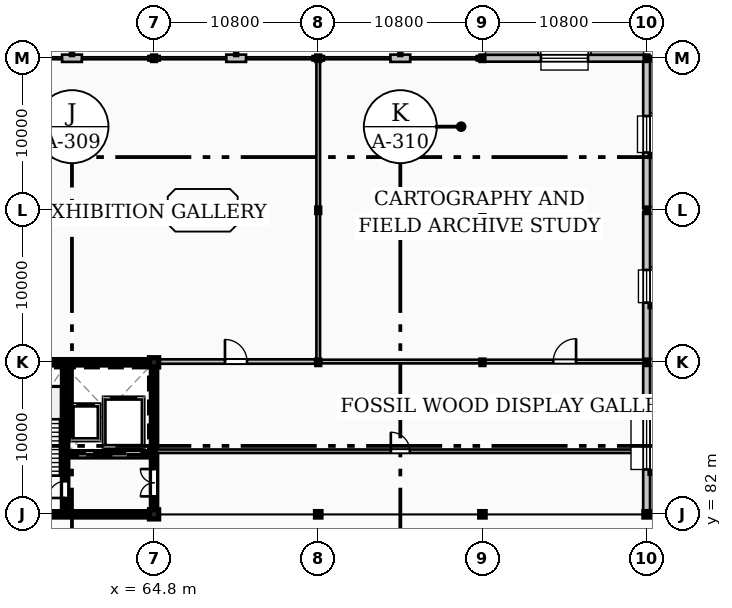
"""IFC4 building model, lengths in metres.
Left out: names, types, materials, properties, quantities, classifications, styles, units other than length and angle.
Written with IfcOpenShell. Run it as: python <this file> out.ifc"""

import sys

from ifc_helpers import new_model, si_unit, direction, frame, frame_2d, origin, origin_2d, place, context, subcontext, project, spatial, polyline, rectangle, hollow_rectangle, hollow_circle, outline, extrude, element, fill, save


model = new_model("IFC4")
c1 = context("Model", 3, precision=1e-05, world=origin(), true_north=direction((0.0, 1.0)))
c2 = subcontext(c1, "Body", "Model", "MODEL_VIEW")
j1 = project(units=[si_unit("LENGTHUNIT", "METRE"), si_unit("PLANEANGLEUNIT", "RADIAN")], contexts=[c1])
p1 = place(None, origin())
s1 = spatial("IfcSite", under=j1, at=p1, CompositionType="ELEMENT")
p2 = place(p1, origin())
s2 = spatial("IfcBuilding", under=s1, at=p2, CompositionType="ELEMENT")
p3 = place(p2, frame((0.0, 0.0, 9.6)))
s3 = spatial("IfcBuildingStorey", under=s2, at=p3, CompositionType="ELEMENT", Elevation=9.6)
for number, where, z_axis, x_axis in (
    (1, (64.8, 82.0, 0.0), (0.0, 0.0, 1.0), (1.0, 0.0, 0.0)),
    (2, (64.8, 92.0, 0.0), (0.0, 0.0, 1.0), (1.0, 0.0, 0.0)),
):
    element("IfcColumn", number, at=place(p3, frame(where, z_axis=z_axis, x_axis=x_axis)), inside=s3, PredefinedType="COLUMN", context=c2, shape_type="SweptSolid", body=[
        extrude(rectangle(XDim=0.6, YDim=0.6, at=origin_2d()), origin(), (0.0, 0.0, 1.0), 4.8),
    ])
for number, where, z_axis, x_axis in (
    (3, (64.8, 102.0, 0.0), (0.0, 0.0, 1.0), (1.0, 0.0, 0.0)),
    (4, (64.8, 112.0, 0.0), (0.0, 0.0, 1.0), (1.0, 0.0, 0.0)),
):
    element("IfcColumn", number, at=place(p3, frame(where, z_axis=z_axis, x_axis=x_axis)), inside=s3, PredefinedType="COLUMN", context=c2, shape_type="SweptSolid", body=[
        extrude(hollow_rectangle(XDim=0.2, YDim=0.3, WallThickness=0.012, InnerFilletRadius=0.012, OuterFilletRadius=0.025, at=origin_2d()), origin(), (0.0, 0.0, 1.0), 4.8),
    ])
p4 = place(p3, frame((75.6, 82.0, 0.0), z_axis=(0.0, 0.0, 1.0), x_axis=(1.0, 0.0, 0.0)))
e5 = element("IfcColumn", 5, at=p4, inside=s3, PredefinedType="COLUMN", context=c2, shape_type="SweptSolid", body=[
    extrude(hollow_circle(Radius=0.178, WallThickness=0.016, at=origin_2d()), origin(), (0.0, 0.0, 1.0), 4.8),
])
for number, where, z_axis, x_axis in (
    (6, (75.6, 92.0, 0.0), (0.0, 0.0, 1.0), (1.0, 0.0, 0.0)),
    (7, (75.6, 102.0, 0.0), (0.0, 0.0, 1.0), (1.0, 0.0, 0.0)),
    (8, (75.6, 112.0, 0.0), (0.0, 0.0, 1.0), (1.0, 0.0, 0.0)),
):
    element("IfcColumn", number, at=place(p3, frame(where, z_axis=z_axis, x_axis=x_axis)), inside=s3, PredefinedType="COLUMN", context=c2, shape_type="SweptSolid", body=[
        extrude(hollow_rectangle(XDim=0.2, YDim=0.3, WallThickness=0.012, InnerFilletRadius=0.012, OuterFilletRadius=0.025, at=origin_2d()), origin(), (0.0, 0.0, 1.0), 4.8),
    ])
p5 = place(p3, frame((86.4, 82.0, 0.0), z_axis=(0.0, 0.0, 1.0), x_axis=(1.0, 0.0, 0.0)))
e9 = element("IfcColumn", 9, at=p5, inside=s3, PredefinedType="COLUMN", context=c2, shape_type="SweptSolid", body=[
    extrude(hollow_circle(Radius=0.178, WallThickness=0.016, at=origin_2d()), origin(), (0.0, 0.0, 1.0), 4.8),
])
for number, where, z_axis, x_axis in (
    (10, (86.4, 92.0, 0.0), (0.0, 0.0, 1.0), (1.0, 0.0, 0.0)),
    (11, (86.4, 102.0, 0.0), (0.0, 0.0, 1.0), (1.0, 0.0, 0.0)),
    (12, (86.4, 112.0, 0.0), (0.0, 0.0, 1.0), (1.0, 0.0, 0.0)),
):
    element("IfcColumn", number, at=place(p3, frame(where, z_axis=z_axis, x_axis=x_axis)), inside=s3, PredefinedType="COLUMN", context=c2, shape_type="SweptSolid", body=[
        extrude(hollow_rectangle(XDim=0.2, YDim=0.3, WallThickness=0.012, InnerFilletRadius=0.012, OuterFilletRadius=0.025, at=origin_2d()), origin(), (0.0, 0.0, 1.0), 4.8),
    ])
p6 = place(p3, frame((97.2, 82.0, 0.0), z_axis=(0.0, 0.0, 1.0), x_axis=(1.0, 0.0, 0.0)))
e13 = element("IfcColumn", 13, at=p6, inside=s3, PredefinedType="COLUMN", context=c2, shape_type="SweptSolid", body=[
    extrude(hollow_circle(Radius=0.178, WallThickness=0.016, at=origin_2d()), origin(), (0.0, 0.0, 1.0), 4.8),
])
for number, where, z_axis, x_axis in (
    (14, (97.2, 92.0, 0.0), (0.0, 0.0, 1.0), (1.0, 0.0, 0.0)),
    (15, (97.2, 102.0, 0.0), (0.0, 0.0, 1.0), (1.0, 0.0, 0.0)),
    (16, (97.2, 112.0, 0.0), (0.0, 0.0, 1.0), (1.0, 0.0, 0.0)),
):
    element("IfcColumn", number, at=place(p3, frame(where, z_axis=z_axis, x_axis=x_axis)), inside=s3, PredefinedType="COLUMN", context=c2, shape_type="SweptSolid", body=[
        extrude(hollow_rectangle(XDim=0.2, YDim=0.3, WallThickness=0.012, InnerFilletRadius=0.012, OuterFilletRadius=0.025, at=origin_2d()), origin(), (0.0, 0.0, 1.0), 4.8),
    ])
p7 = place(p3, frame((97.57, 82.0, 0.0), z_axis=(0.0, 0.0, 1.0), x_axis=(-1.0, 0.0, 0.0)))
e17 = element("IfcWall", 17, at=p7, inside=s3, PredefinedType="STANDARD", context=c2, shape_type="SweptSolid", body=[
    extrude(rectangle(XDim=0.225, YDim=0.3, at=frame_2d((0.113, 0.0))), origin(), (0.0, 0.0, 1.0), 4.56),
])
p8 = place(p3, frame((97.2, 82.145, 0.0), z_axis=(0.0, 0.0, 1.0), x_axis=(0.0, 1.0, 0.0)))
e18 = element("IfcWall", 18, at=p8, inside=s3, PredefinedType="STANDARD", context=c2, shape_type="SweptSolid", body=[
    extrude(rectangle(XDim=9.71, YDim=0.45, at=frame_2d((4.855, 0.0))), origin(), (0.0, 0.0, 1.0), 4.56),
])
p9 = place(p8, frame((2.805, 0.0, 1.0)))
e19 = element("IfcOpeningElement", 19, at=p9, cuts=e18, PredefinedType="OPENING", context=c2, shape_type="SweptSolid", body=[
    extrude(rectangle(XDim=4.1, YDim=1.9, at=frame_2d((2.05, 0.95))), frame((0.0, 0.235, 0.0), z_axis=(0.0, -1.0, 0.0), x_axis=(1.0, 0.0, 0.0)), (0.0, 0.0, 1.0), 0.47),
])
p10 = place(p3, frame((97.2, 92.145, 0.0), z_axis=(0.0, 0.0, 1.0), x_axis=(0.0, 1.0, 0.0)))
e20 = element("IfcWall", 20, at=p10, inside=s3, PredefinedType="STANDARD", context=c2, shape_type="SweptSolid", body=[
    extrude(rectangle(XDim=9.71, YDim=0.45, at=frame_2d((4.855, 0.0))), origin(), (0.0, 0.0, 1.0), 4.56),
])
p11 = place(p10, frame((3.78, 0.0, 1.0)))
e21 = element("IfcOpeningElement", 21, at=p11, cuts=e20, PredefinedType="OPENING", context=c2, shape_type="SweptSolid", body=[
    extrude(rectangle(XDim=2.15, YDim=2.65, at=frame_2d((1.075, 1.325))), frame((0.0, 0.235, 0.0), z_axis=(0.0, -1.0, 0.0), x_axis=(1.0, 0.0, 0.0)), (0.0, 0.0, 1.0), 0.47),
])
p12 = place(p3, frame((97.2, 102.145, 0.0), z_axis=(0.0, 0.0, 1.0), x_axis=(0.0, 1.0, 0.0)))
e22 = element("IfcWall", 22, at=p12, inside=s3, PredefinedType="STANDARD", context=c2, shape_type="SweptSolid", body=[
    extrude(rectangle(XDim=9.71, YDim=0.45, at=frame_2d((4.855, 0.0))), origin(), (0.0, 0.0, 1.0), 4.56),
])
p13 = place(p12, frame((3.655, 0.0, 1.0)))
e23 = element("IfcOpeningElement", 23, at=p13, cuts=e22, PredefinedType="OPENING", context=c2, shape_type="SweptSolid", body=[
    extrude(rectangle(XDim=2.4, YDim=2.4, at=frame_2d((1.2, 1.2))), frame((0.0, 0.235, 0.0), z_axis=(0.0, -1.0, 0.0), x_axis=(1.0, 0.0, 0.0)), (0.0, 0.0, 1.0), 0.47),
])
p14 = place(p3, frame((97.104, 112.0, 0.0), z_axis=(0.0, 0.0, 1.0), x_axis=(-1.0, 0.0, 0.0)))
e24 = element("IfcWall", 24, at=p14, inside=s3, PredefinedType="STANDARD", context=c2, shape_type="SweptSolid", body=[
    extrude(rectangle(XDim=10.608, YDim=0.45, at=frame_2d((5.304, 0.0))), origin(), (0.0, 0.0, 1.0), 4.119),
])
p15 = place(p14, frame((3.754, 0.0, 1.0)))
e25 = element("IfcOpeningElement", 25, at=p15, cuts=e24, PredefinedType="OPENING", context=c2, shape_type="SweptSolid", body=[
    extrude(rectangle(XDim=3.1, YDim=2.75, at=frame_2d((1.55, 1.375))), frame((0.0, 0.235, 0.0), z_axis=(0.0, -1.0, 0.0), x_axis=(1.0, 0.0, 0.0)), (0.0, 0.0, 1.0), 0.47),
])
p16 = place(p3, frame((81.65, 112.0, 0.0), z_axis=(0.0, 0.0, 1.0), x_axis=(-1.0, 0.0, 0.0)))
e26 = element("IfcWall", 26, at=p16, inside=s3, PredefinedType="STANDARD", context=c2, shape_type="SweptSolid", body=[
    extrude(rectangle(XDim=1.3, YDim=0.48, at=frame_2d((0.65, 0.0))), origin(), (0.0, 0.0, 1.0), 4.119),
])
for number, where, z_axis, x_axis in (
    (27, (86.304, 112.0, 0.0), (0.0, 0.0, 1.0), (-1.0, 0.0, 0.0)),
    (28, (75.97, 112.0, 0.0), (0.0, 0.0, 1.0), (-1.0, 0.0, 0.0)),
):
    element("IfcWall", number, at=place(p3, frame(where, z_axis=z_axis, x_axis=x_axis)), inside=s3, PredefinedType="STANDARD", context=c2, shape_type="SweptSolid", body=[
        extrude(rectangle(XDim=0.274, YDim=0.3, at=frame_2d((0.137, 0.0))), origin(), (0.0, 0.0, 1.0), 4.56),
    ])
p17 = place(p3, frame((70.85, 112.0, 0.0), z_axis=(0.0, 0.0, 1.0), x_axis=(-1.0, 0.0, 0.0)))
e29 = element("IfcWall", 29, at=p17, inside=s3, PredefinedType="STANDARD", context=c2, shape_type="SweptSolid", body=[
    extrude(rectangle(XDim=1.3, YDim=0.48, at=frame_2d((0.65, 0.0))), origin(), (0.0, 0.0, 1.0), 4.119),
])
for number, where, z_axis, x_axis in (
    (30, (75.504, 112.0, 0.0), (0.0, 0.0, 1.0), (-1.0, 0.0, 0.0)),
    (31, (65.17, 112.0, 0.0), (0.0, 0.0, 1.0), (-1.0, 0.0, 0.0)),
):
    element("IfcWall", number, at=place(p3, frame(where, z_axis=z_axis, x_axis=x_axis)), inside=s3, PredefinedType="STANDARD", context=c2, shape_type="SweptSolid", body=[
        extrude(rectangle(XDim=0.274, YDim=0.3, at=frame_2d((0.137, 0.0))), origin(), (0.0, 0.0, 1.0), 4.56),
    ])
p18 = place(p3, frame((60.05, 112.0, 0.0), z_axis=(0.0, 0.0, 1.0), x_axis=(-1.0, 0.0, 0.0)))
e32 = element("IfcWall", 32, at=p18, inside=s3, PredefinedType="STANDARD", context=c2, shape_type="SweptSolid", body=[
    extrude(rectangle(XDim=1.3, YDim=0.48, at=frame_2d((0.65, 0.0))), origin(), (0.0, 0.0, 1.0), 4.119),
])
p19 = place(p3, frame((64.704, 112.0, 0.0), z_axis=(0.0, 0.0, 1.0), x_axis=(-1.0, 0.0, 0.0)))
e33 = element("IfcWall", 33, at=p19, inside=s3, PredefinedType="STANDARD", context=c2, shape_type="SweptSolid", body=[
    extrude(rectangle(XDim=0.274, YDim=0.3, at=frame_2d((0.137, 0.0))), origin(), (0.0, 0.0, 1.0), 4.56),
])
p20 = place(p3, frame((97.55, 112.0, -0.02), z_axis=(0.0, 0.0, 1.0), x_axis=(1.0, 0.0, 0.0)))
e34 = element("IfcWall", 34, at=p20, inside=s3, PredefinedType="STANDARD", context=c2, shape_type="SweptSolid", body=[
    extrude(outline(polyline([(0.0, 0.0), (10.25, 0.0), (10.25, 0.04), (0.0, 1.17), (0.0, 0.0)])), frame((0.0, 0.14, 0.0), z_axis=(0.0, -1.0, 0.0), x_axis=(1.0, 0.0, 0.0)), (0.0, 0.0, 1.0), 0.28),
])
for number, where, z_axis, x_axis in (
    (35, (54.3, 82.0, 0.0), (0.0, 0.0, 1.0), (1.0, 0.0, 0.0)),
    (36, (54.3, 92.0, 0.0), (0.0, 0.0, 1.0), (1.0, 0.0, 0.0)),
):
    element("IfcWall", number, at=place(p3, frame(where, z_axis=z_axis, x_axis=x_axis)), inside=s3, PredefinedType="SHEAR", context=c2, shape_type="SweptSolid", body=[
        extrude(rectangle(XDim=10.2, YDim=0.35, at=frame_2d((5.1, 0.0))), origin(), (0.0, 0.0, 1.0), 4.56),
    ])
p21 = place(p3, frame((64.8, 82.3, 0.0), z_axis=(0.0, 0.0, 1.0), x_axis=(0.0, 1.0, 0.0)))
e37 = element("IfcWall", 37, at=p21, inside=s3, PredefinedType="SHEAR", context=c2, shape_type="SweptSolid", body=[
    extrude(rectangle(XDim=9.4, YDim=0.35, at=frame_2d((4.7, 0.0))), origin(), (0.0, 0.0, 1.0), 4.56),
])
p22 = place(p21, frame((0.88, 0.0, 0.0)))
e38 = element("IfcOpeningElement", 38, at=p22, cuts=e37, PredefinedType="OPENING", context=c2, shape_type="SweptSolid", body=[
    extrude(rectangle(XDim=1.8, YDim=2.25, at=frame_2d((0.9, 1.125))), frame((0.0, 0.185, 0.0), z_axis=(0.0, -1.0, 0.0), x_axis=(1.0, 0.0, 0.0)), (0.0, 0.0, 1.0), 0.37),
])
p23 = place(p3, frame((58.95, 82.175, 0.0), z_axis=(0.0, 0.0, 1.0), x_axis=(0.0, 1.0, 0.0)))
e39 = element("IfcWall", 39, at=p23, inside=s3, PredefinedType="SHEAR", context=c2, shape_type="SweptSolid", body=[
    extrude(rectangle(XDim=9.65, YDim=0.35, at=frame_2d((4.825, 0.0))), origin(), (0.0, 0.0, 1.0), 4.56),
])
p24 = place(p23, frame((0.9, 0.0, 0.0)))
e40 = element("IfcOpeningElement", 40, at=p24, cuts=e39, PredefinedType="OPENING", context=c2, shape_type="SweptSolid", body=[
    extrude(rectangle(XDim=1.1, YDim=2.2, at=frame_2d((0.55, 1.1))), frame((0.0, 0.185, 0.0), z_axis=(0.0, -1.0, 0.0), x_axis=(1.0, 0.0, 0.0)), (0.0, 0.0, 1.0), 0.37),
])
p25 = place(p3, frame((59.13, 85.95, 0.0), z_axis=(0.0, 0.0, 1.0), x_axis=(1.0, 0.0, 0.0)))
e41 = element("IfcWall", 41, at=p25, inside=s3, PredefinedType="SHEAR", context=c2, shape_type="SweptSolid", body=[
    extrude(rectangle(XDim=5.49, YDim=0.35, at=frame_2d((2.745, 0.0))), origin(), (0.0, 0.0, 1.0), 4.56),
])
p26 = place(p25, frame((0.65, 0.0, 0.0)))
e42 = element("IfcOpeningElement", 42, at=p26, cuts=e41, PredefinedType="OPENING", context=c2, shape_type="SweptSolid", body=[
    extrude(rectangle(XDim=1.1, YDim=2.2, at=frame_2d((0.55, 1.1))), frame((0.0, 0.185, 0.0), z_axis=(0.0, -1.0, 0.0), x_axis=(1.0, 0.0, 0.0)), (0.0, 0.0, 1.0), 0.37),
])
p27 = place(p25, frame((2.85, 0.0, 0.0)))
e43 = element("IfcOpeningElement", 43, at=p27, cuts=e41, PredefinedType="OPENING", context=c2, shape_type="SweptSolid", body=[
    extrude(rectangle(XDim=2.0, YDim=2.5, at=frame_2d((1.0, 1.25))), frame((0.0, 0.185, 0.0), z_axis=(0.0, -1.0, 0.0), x_axis=(1.0, 0.0, 0.0)), (0.0, 0.0, 1.0), 0.37),
])
p28 = place(p3, frame((64.98, 86.15, 0.0), z_axis=(0.0, 0.0, 1.0), x_axis=(1.0, 0.0, 0.0)))
e44 = element("IfcWall", 44, at=p28, inside=s3, PredefinedType="PARTITIONING", context=c2, shape_type="SweptSolid", body=[
    extrude(rectangle(XDim=32.04, YDim=0.23, at=frame_2d((16.02, 0.0))), origin(), (0.0, 0.0, 1.0), 4.52),
])
p29 = place(p28, frame((15.395, 0.0, 0.0)))
e45 = element("IfcOpeningElement", 45, at=p29, cuts=e44, PredefinedType="OPENING", context=c2, shape_type="SweptSolid", body=[
    extrude(rectangle(XDim=1.25, YDim=2.3, at=frame_2d((0.625, 1.15))), frame((0.0, 0.125, 0.0), z_axis=(0.0, -1.0, 0.0), x_axis=(1.0, 0.0, 0.0)), (0.0, 0.0, 1.0), 0.25),
])
p30 = place(p3, frame((64.98, 92.05, 0.0), z_axis=(0.0, 0.0, 1.0), x_axis=(1.0, 0.0, 0.0)))
e46 = element("IfcWall", 46, at=p30, inside=s3, PredefinedType="PARTITIONING", context=c2, shape_type="SweptSolid", body=[
    extrude(rectangle(XDim=10.42, YDim=0.29, at=frame_2d((5.21, 0.0))), origin(), (0.0, 0.0, 1.0), 4.119),
])
p31 = place(p30, frame((4.485, 0.0, 0.0)))
e47 = element("IfcOpeningElement", 47, at=p31, cuts=e46, PredefinedType="OPENING", context=c2, shape_type="SweptSolid", body=[
    extrude(rectangle(XDim=1.45, YDim=2.35, at=frame_2d((0.725, 1.175))), frame((0.0, 0.155, 0.0), z_axis=(0.0, -1.0, 0.0), x_axis=(1.0, 0.0, 0.0)), (0.0, 0.0, 1.0), 0.31),
])
p32 = place(p3, frame((75.8, 92.05, 0.0), z_axis=(0.0, 0.0, 1.0), x_axis=(1.0, 0.0, 0.0)))
e48 = element("IfcWall", 48, at=p32, inside=s3, PredefinedType="SOLIDWALL", context=c2, shape_type="SweptSolid", body=[
    extrude(rectangle(XDim=10.4, YDim=0.24, at=frame_2d((5.2, 0.0))), origin(), (0.0, 0.0, 1.0), 4.119),
])
p33 = place(p3, frame((86.6, 92.05, 0.0), z_axis=(0.0, 0.0, 1.0), x_axis=(1.0, 0.0, 0.0)))
e49 = element("IfcWall", 49, at=p33, inside=s3, PredefinedType="SOLIDWALL", context=c2, shape_type="SweptSolid", body=[
    extrude(rectangle(XDim=10.42, YDim=0.24, at=frame_2d((5.21, 0.0))), origin(), (0.0, 0.0, 1.0), 4.119),
])
p34 = place(p33, frame((4.46, 0.0, 0.0)))
e50 = element("IfcOpeningElement", 50, at=p34, cuts=e49, PredefinedType="OPENING", context=c2, shape_type="SweptSolid", body=[
    extrude(rectangle(XDim=1.5, YDim=2.4, at=frame_2d((0.75, 1.2))), frame((0.0, 0.13, 0.0), z_axis=(0.0, -1.0, 0.0), x_axis=(1.0, 0.0, 0.0)), (0.0, 0.0, 1.0), 0.26),
])
for number, where, z_axis, x_axis in (
    (51, (75.6, 92.18, 0.0), (0.0, 0.0, 1.0), (0.0, 1.0, 0.0)),
    (52, (75.6, 102.2, 0.0), (0.0, 0.0, 1.0), (0.0, 1.0, 0.0)),
):
    element("IfcWall", number, at=place(p3, frame(where, z_axis=z_axis, x_axis=x_axis)), inside=s3, PredefinedType="SOLIDWALL", context=c2, shape_type="SweptSolid", body=[
        extrude(rectangle(XDim=9.62, YDim=0.24, at=frame_2d((4.81, 0.0))), origin(), (0.0, 0.0, 1.0), 4.059),
    ])
p35 = place(p9, origin())
e53 = element("IfcWindow", 53, at=p35, inside=s3, PartitioningType="SINGLE_PANEL", PredefinedType="WINDOW", context=c2, shape_type="SweptSolid", body=[
    extrude(rectangle(XDim=4.1, YDim=1.9, at=frame_2d((2.05, 0.95))), frame((0.0, 0.03, 0.0), z_axis=(0.0, -1.0, 0.0), x_axis=(1.0, 0.0, 0.0)), (0.0, 0.0, 1.0), 0.06),
])
fill(e19, e53)
p36 = place(p11, origin())
e54 = element("IfcWindow", 54, at=p36, inside=s3, PartitioningType="SINGLE_PANEL", PredefinedType="WINDOW", context=c2, shape_type="SweptSolid", body=[
    extrude(rectangle(XDim=2.15, YDim=2.65, at=frame_2d((1.075, 1.325))), frame((0.0, 0.03, 0.0), z_axis=(0.0, -1.0, 0.0), x_axis=(1.0, 0.0, 0.0)), (0.0, 0.0, 1.0), 0.06),
])
fill(e21, e54)
p37 = place(p13, origin())
e55 = element("IfcWindow", 55, at=p37, inside=s3, PartitioningType="SINGLE_PANEL", PredefinedType="WINDOW", context=c2, shape_type="SweptSolid", body=[
    extrude(rectangle(XDim=2.4, YDim=2.4, at=frame_2d((1.2, 1.2))), frame((0.0, 0.03, 0.0), z_axis=(0.0, -1.0, 0.0), x_axis=(1.0, 0.0, 0.0)), (0.0, 0.0, 1.0), 0.06),
])
fill(e23, e55)
p38 = place(p15, origin())
e56 = element("IfcWindow", 56, at=p38, inside=s3, PartitioningType="SINGLE_PANEL", PredefinedType="WINDOW", context=c2, shape_type="SweptSolid", body=[
    extrude(rectangle(XDim=3.1, YDim=2.75, at=frame_2d((1.55, 1.375))), frame((0.0, 0.03, 0.0), z_axis=(0.0, -1.0, 0.0), x_axis=(1.0, 0.0, 0.0)), (0.0, 0.0, 1.0), 0.06),
])
fill(e25, e56)
p39 = place(p24, origin())
e57 = element("IfcDoor", 57, at=p39, inside=s3, OperationType="SINGLE_SWING_LEFT", PredefinedType="DOOR", context=c2, shape_type="SweptSolid", body=[
    extrude(rectangle(XDim=1.1, YDim=2.2, at=frame_2d((0.55, 1.1))), frame((0.0, 0.025, 0.0), z_axis=(0.0, -1.0, 0.0), x_axis=(1.0, 0.0, 0.0)), (0.0, 0.0, 1.0), 0.05),
])
fill(e40, e57)
p40 = place(p22, origin())
e58 = element("IfcDoor", 58, at=p40, inside=s3, OperationType="DOUBLE_DOOR_SINGLE_SWING", PredefinedType="DOOR", context=c2, shape_type="SweptSolid", body=[
    extrude(rectangle(XDim=1.8, YDim=2.25, at=frame_2d((0.9, 1.125))), frame((0.0, 0.025, 0.0), z_axis=(0.0, -1.0, 0.0), x_axis=(1.0, 0.0, 0.0)), (0.0, 0.0, 1.0), 0.05),
])
fill(e38, e58)
p41 = place(p26, origin())
e59 = element("IfcDoor", 59, at=p41, inside=s3, OperationType="DOUBLE_DOOR_SLIDING", PredefinedType="DOOR", context=c2, shape_type="SweptSolid", body=[
    extrude(rectangle(XDim=1.1, YDim=2.2, at=frame_2d((0.55, 1.1))), frame((0.0, 0.025, 0.0), z_axis=(0.0, -1.0, 0.0), x_axis=(1.0, 0.0, 0.0)), (0.0, 0.0, 1.0), 0.05),
])
fill(e42, e59)
p42 = place(p27, origin())
e60 = element("IfcDoor", 60, at=p42, inside=s3, OperationType="DOUBLE_DOOR_SLIDING", PredefinedType="DOOR", context=c2, shape_type="SweptSolid", body=[
    extrude(rectangle(XDim=2.0, YDim=2.5, at=frame_2d((1.0, 1.25))), frame((0.0, 0.025, 0.0), z_axis=(0.0, -1.0, 0.0), x_axis=(1.0, 0.0, 0.0)), (0.0, 0.0, 1.0), 0.05),
])
fill(e43, e60)
p43 = place(p29, origin())
e61 = element("IfcDoor", 61, at=p43, inside=s3, OperationType="SINGLE_SWING_LEFT", PredefinedType="DOOR", context=c2, shape_type="SweptSolid", body=[
    extrude(rectangle(XDim=1.25, YDim=2.3, at=frame_2d((0.625, 1.15))), frame((0.0, 0.025, 0.0), z_axis=(0.0, -1.0, 0.0), x_axis=(1.0, 0.0, 0.0)), (0.0, 0.0, 1.0), 0.05),
])
fill(e45, e61)
p44 = place(p31, origin())
e62 = element("IfcDoor", 62, at=p44, inside=s3, OperationType="SINGLE_SWING_LEFT", PredefinedType="DOOR", context=c2, shape_type="SweptSolid", body=[
    extrude(rectangle(XDim=1.45, YDim=2.35, at=frame_2d((0.725, 1.175))), frame((0.0, 0.025, 0.0), z_axis=(0.0, -1.0, 0.0), x_axis=(1.0, 0.0, 0.0)), (0.0, 0.0, 1.0), 0.05),
])
fill(e47, e62)
p45 = place(p34, origin())
e63 = element("IfcDoor", 63, at=p45, inside=s3, OperationType="SINGLE_SWING_RIGHT", PredefinedType="DOOR", context=c2, shape_type="SweptSolid", body=[
    extrude(rectangle(XDim=1.5, YDim=2.4, at=frame_2d((0.75, 1.2))), frame((0.0, 0.025, 0.0), z_axis=(0.0, -1.0, 0.0), x_axis=(1.0, 0.0, 0.0)), (0.0, 0.0, 1.0), 0.05),
])
fill(e50, e63)
save(model, sys.argv[1])
